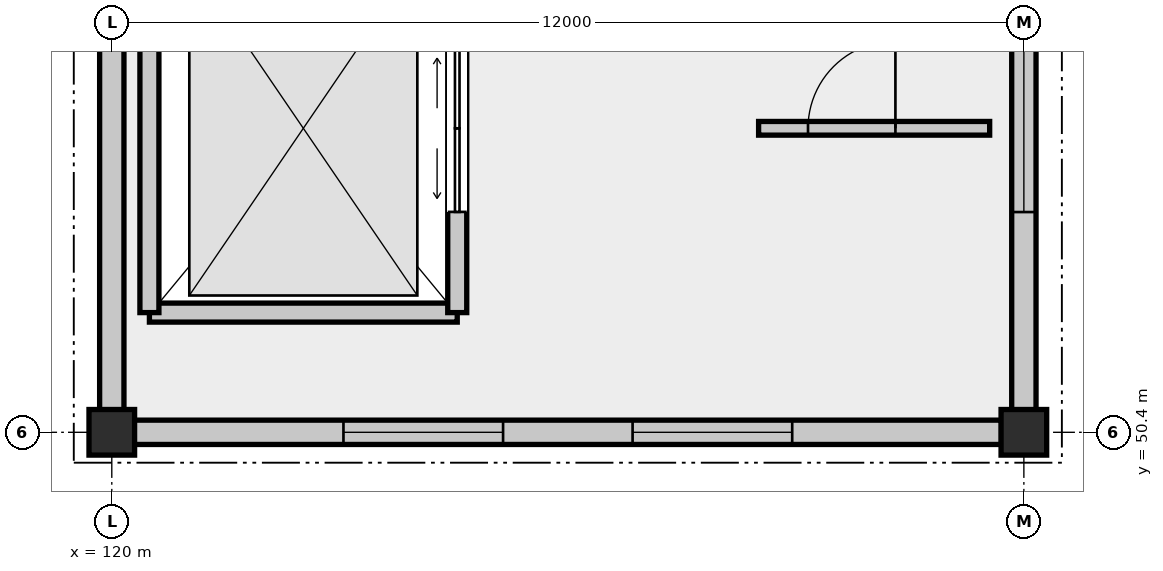
"""IFC4 building model, lengths in metres.
Left out: names, types, materials, properties, quantities, classifications, styles, units other than length and angle.
Written with IfcOpenShell. Run it as: python <this file> out.ifc"""

import sys

from ifc_helpers import new_model, si_unit, direction, frame, frame_2d, origin, origin_2d, place, context, subcontext, project, spatial, rectangle, extrude, element, fill, save


model = new_model("IFC4")
c1 = context("Model", 3, precision=1e-05, world=origin(), true_north=direction((0.0, 1.0)))
c2 = subcontext(c1, "Body", "Model", "MODEL_VIEW")
j1 = project(units=[si_unit("LENGTHUNIT", "METRE"), si_unit("PLANEANGLEUNIT", "RADIAN")], contexts=[c1])
p1 = place(None, origin())
s1 = spatial("IfcSite", under=j1, at=p1, CompositionType="ELEMENT")
p2 = place(p1, origin())
s2 = spatial("IfcBuilding", under=s1, at=p2, CompositionType="ELEMENT")
p3 = place(p2, frame((0.0, 0.0, 16.8)))
s3 = spatial("IfcBuildingStorey", under=s2, at=p3, CompositionType="ELEMENT", Elevation=16.8)
for number, where, z_axis, x_axis in (
    (1, (120.0, 50.4, 0.0), (0.0, 0.0, 1.0), (1.0, 0.0, 0.0)),
    (2, (132.0, 50.4, 0.0), (0.0, 0.0, 1.0), (1.0, 0.0, 0.0)),
):
    element("IfcColumn", number, at=place(p3, frame(where, z_axis=z_axis, x_axis=x_axis)), inside=s3, PredefinedType="COLUMN", context=c2, shape_type="SweptSolid", body=[
        extrude(rectangle(XDim=0.6, YDim=0.6, at=origin_2d()), origin(), (0.0, 0.0, 1.0), 6.6),
    ])
p4 = place(p3, frame((120.295, 50.4, 0.0), z_axis=(0.0, 0.0, 1.0), x_axis=(1.0, 0.0, 0.0)))
e3 = element("IfcWall", 3, at=p4, inside=s3, PredefinedType="SOLIDWALL", context=c2, shape_type="SweptSolid", body=[
    extrude(rectangle(XDim=11.41, YDim=0.32, at=frame_2d((5.705, 0.0))), origin(), (0.0, 0.0, 1.0), 5.75),
])
p5 = place(p4, frame((2.753, 0.0, 0.95)))
e4 = element("IfcOpeningElement", 4, at=p5, cuts=e3, PredefinedType="OPENING", context=c2, shape_type="SweptSolid", body=[
    extrude(rectangle(XDim=2.1, YDim=1.8, at=frame_2d((1.05, 0.9))), frame((0.0, 0.17, 0.0), z_axis=(0.0, -1.0, 0.0), x_axis=(1.0, 0.0, 0.0)), (0.0, 0.0, 1.0), 0.34),
])
p6 = place(p4, frame((6.557, 0.0, 0.95)))
e5 = element("IfcOpeningElement", 5, at=p6, cuts=e3, PredefinedType="OPENING", context=c2, shape_type="SweptSolid", body=[
    extrude(rectangle(XDim=2.1, YDim=1.8, at=frame_2d((1.05, 0.9))), frame((0.0, 0.17, 0.0), z_axis=(0.0, -1.0, 0.0), x_axis=(1.0, 0.0, 0.0)), (0.0, 0.0, 1.0), 0.34),
])
p7 = place(p3, frame((120.0, 62.105, 0.0), z_axis=(0.0, 0.0, 1.0), x_axis=(0.0, -1.0, 0.0)))
e6 = element("IfcWall", 6, at=p7, inside=s3, PredefinedType="SOLIDWALL", context=c2, shape_type="SweptSolid", body=[
    extrude(rectangle(XDim=11.41, YDim=0.32, at=frame_2d((5.705, 0.0))), origin(), (0.0, 0.0, 1.0), 5.75),
])
p8 = place(p3, frame((132.0, 50.695, 0.0), z_axis=(0.0, 0.0, 1.0), x_axis=(0.0, 1.0, 0.0)))
e7 = element("IfcWall", 7, at=p8, inside=s3, PredefinedType="SOLIDWALL", context=c2, shape_type="SweptSolid", body=[
    extrude(rectangle(XDim=11.41, YDim=0.32, at=frame_2d((5.705, 0.0))), origin(), (0.0, 0.0, 1.0), 5.75),
])
p9 = place(p8, frame((2.603, 0.0, 0.95)))
e8 = element("IfcOpeningElement", 8, at=p9, cuts=e7, PredefinedType="OPENING", context=c2, shape_type="SweptSolid", body=[
    extrude(rectangle(XDim=2.4, YDim=1.8, at=frame_2d((1.2, 0.9))), frame((0.0, 0.17, 0.0), z_axis=(0.0, -1.0, 0.0), x_axis=(1.0, 0.0, 0.0)), (0.0, 0.0, 1.0), 0.34),
])
p10 = place(p8, frame((6.407, 0.0, 0.95)))
e9 = element("IfcOpeningElement", 9, at=p10, cuts=e7, PredefinedType="OPENING", context=c2, shape_type="SweptSolid", body=[
    extrude(rectangle(XDim=2.4, YDim=1.8, at=frame_2d((1.2, 0.9))), frame((0.0, 0.17, 0.0), z_axis=(0.0, -1.0, 0.0), x_axis=(1.0, 0.0, 0.0)), (0.0, 0.0, 1.0), 0.34),
])
p11 = place(p3, frame((120.495, 51.975, 0.0), z_axis=(0.0, 0.0, 1.0), x_axis=(1.0, 0.0, 0.0)))
e10 = element("IfcWall", 10, at=p11, inside=s3, PredefinedType="SOLIDWALL", context=c2, shape_type="SweptSolid", body=[
    extrude(rectangle(XDim=4.05, YDim=0.25, at=frame_2d((2.025, 0.0))), origin(), (0.0, 0.0, 1.0), 6.34),
])
p12 = place(p3, frame((124.545, 51.975, 0.0), z_axis=(0.0, 0.0, 1.0), x_axis=(0.0, 1.0, 0.0)))
e11 = element("IfcWall", 11, at=p12, inside=s3, PredefinedType="SOLIDWALL", context=c2, shape_type="SweptSolid", body=[
    extrude(rectangle(XDim=4.85, YDim=0.25, at=frame_2d((2.425, 0.0))), origin(), (0.0, 0.0, 1.0), 6.34),
])
p13 = place(p12, frame((1.325, 0.0, 0.0)))
e12 = element("IfcOpeningElement", 12, at=p13, cuts=e11, PredefinedType="OPENING", context=c2, shape_type="SweptSolid", body=[
    extrude(rectangle(XDim=2.2, YDim=2.65, at=frame_2d((1.1, 1.325))), frame((0.0, 0.135, 0.0), z_axis=(0.0, -1.0, 0.0), x_axis=(1.0, 0.0, 0.0)), (0.0, 0.0, 1.0), 0.27),
])
p14 = place(p3, frame((120.495, 56.825, 0.0), z_axis=(0.0, 0.0, 1.0), x_axis=(0.0, -1.0, 0.0)))
e13 = element("IfcWall", 13, at=p14, inside=s3, PredefinedType="SOLIDWALL", context=c2, shape_type="SweptSolid", body=[
    extrude(rectangle(XDim=4.85, YDim=0.25, at=frame_2d((2.425, 0.0))), origin(), (0.0, 0.0, 1.0), 6.34),
])
p15 = place(p3, frame((128.51, 54.4, 0.0), z_axis=(0.0, 0.0, 1.0), x_axis=(1.0, 0.0, 0.0)))
e14 = element("IfcWall", 14, at=p15, inside=s3, PredefinedType="PARTITIONING", context=c2, shape_type="SweptSolid", body=[
    extrude(rectangle(XDim=3.04, YDim=0.18, at=frame_2d((1.52, 0.0))), origin(), (0.0, 0.0, 1.0), 5.91),
])
p16 = place(p15, frame((0.65, 0.0, 0.0)))
e15 = element("IfcOpeningElement", 15, at=p16, cuts=e14, PredefinedType="OPENING", context=c2, shape_type="SweptSolid", body=[
    extrude(rectangle(XDim=1.15, YDim=2.25, at=frame_2d((0.575, 1.125))), frame((0.0, 0.1, 0.0), z_axis=(0.0, -1.0, 0.0), x_axis=(1.0, 0.0, 0.0)), (0.0, 0.0, 1.0), 0.2),
])
p17 = place(p5, origin())
e16 = element("IfcWindow", 16, at=p17, inside=s3, PartitioningType="SINGLE_PANEL", PredefinedType="WINDOW", context=c2, shape_type="SweptSolid", body=[
    extrude(rectangle(XDim=2.1, YDim=1.8, at=frame_2d((1.05, 0.9))), frame((0.0, 0.03, 0.0), z_axis=(0.0, -1.0, 0.0), x_axis=(1.0, 0.0, 0.0)), (0.0, 0.0, 1.0), 0.06),
])
fill(e4, e16)
p18 = place(p6, origin())
e17 = element("IfcWindow", 17, at=p18, inside=s3, PartitioningType="SINGLE_PANEL", PredefinedType="WINDOW", context=c2, shape_type="SweptSolid", body=[
    extrude(rectangle(XDim=2.1, YDim=1.8, at=frame_2d((1.05, 0.9))), frame((0.0, 0.03, 0.0), z_axis=(0.0, -1.0, 0.0), x_axis=(1.0, 0.0, 0.0)), (0.0, 0.0, 1.0), 0.06),
])
fill(e5, e17)
p19 = place(p9, origin())
e18 = element("IfcWindow", 18, at=p19, inside=s3, PartitioningType="SINGLE_PANEL", PredefinedType="WINDOW", context=c2, shape_type="SweptSolid", body=[
    extrude(rectangle(XDim=2.4, YDim=1.8, at=frame_2d((1.2, 0.9))), frame((0.0, 0.03, 0.0), z_axis=(0.0, -1.0, 0.0), x_axis=(1.0, 0.0, 0.0)), (0.0, 0.0, 1.0), 0.06),
])
fill(e8, e18)
p20 = place(p13, origin())
e19 = element("IfcDoor", 19, at=p20, inside=s3, OperationType="DOUBLE_DOOR_SLIDING", PredefinedType="DOOR", context=c2, shape_type="SweptSolid", body=[
    extrude(rectangle(XDim=2.2, YDim=2.65, at=frame_2d((1.1, 1.325))), frame((0.0, 0.025, 0.0), z_axis=(0.0, -1.0, 0.0), x_axis=(1.0, 0.0, 0.0)), (0.0, 0.0, 1.0), 0.05),
])
fill(e12, e19)
p21 = place(p16, origin())
e20 = element("IfcDoor", 20, at=p21, inside=s3, OperationType="SINGLE_SWING_RIGHT", PredefinedType="DOOR", context=c2, shape_type="SweptSolid", body=[
    extrude(rectangle(XDim=1.15, YDim=2.25, at=frame_2d((0.575, 1.125))), frame((0.0, 0.025, 0.0), z_axis=(0.0, -1.0, 0.0), x_axis=(1.0, 0.0, 0.0)), (0.0, 0.0, 1.0), 0.05),
])
fill(e15, e20)
save(model, sys.argv[1])
